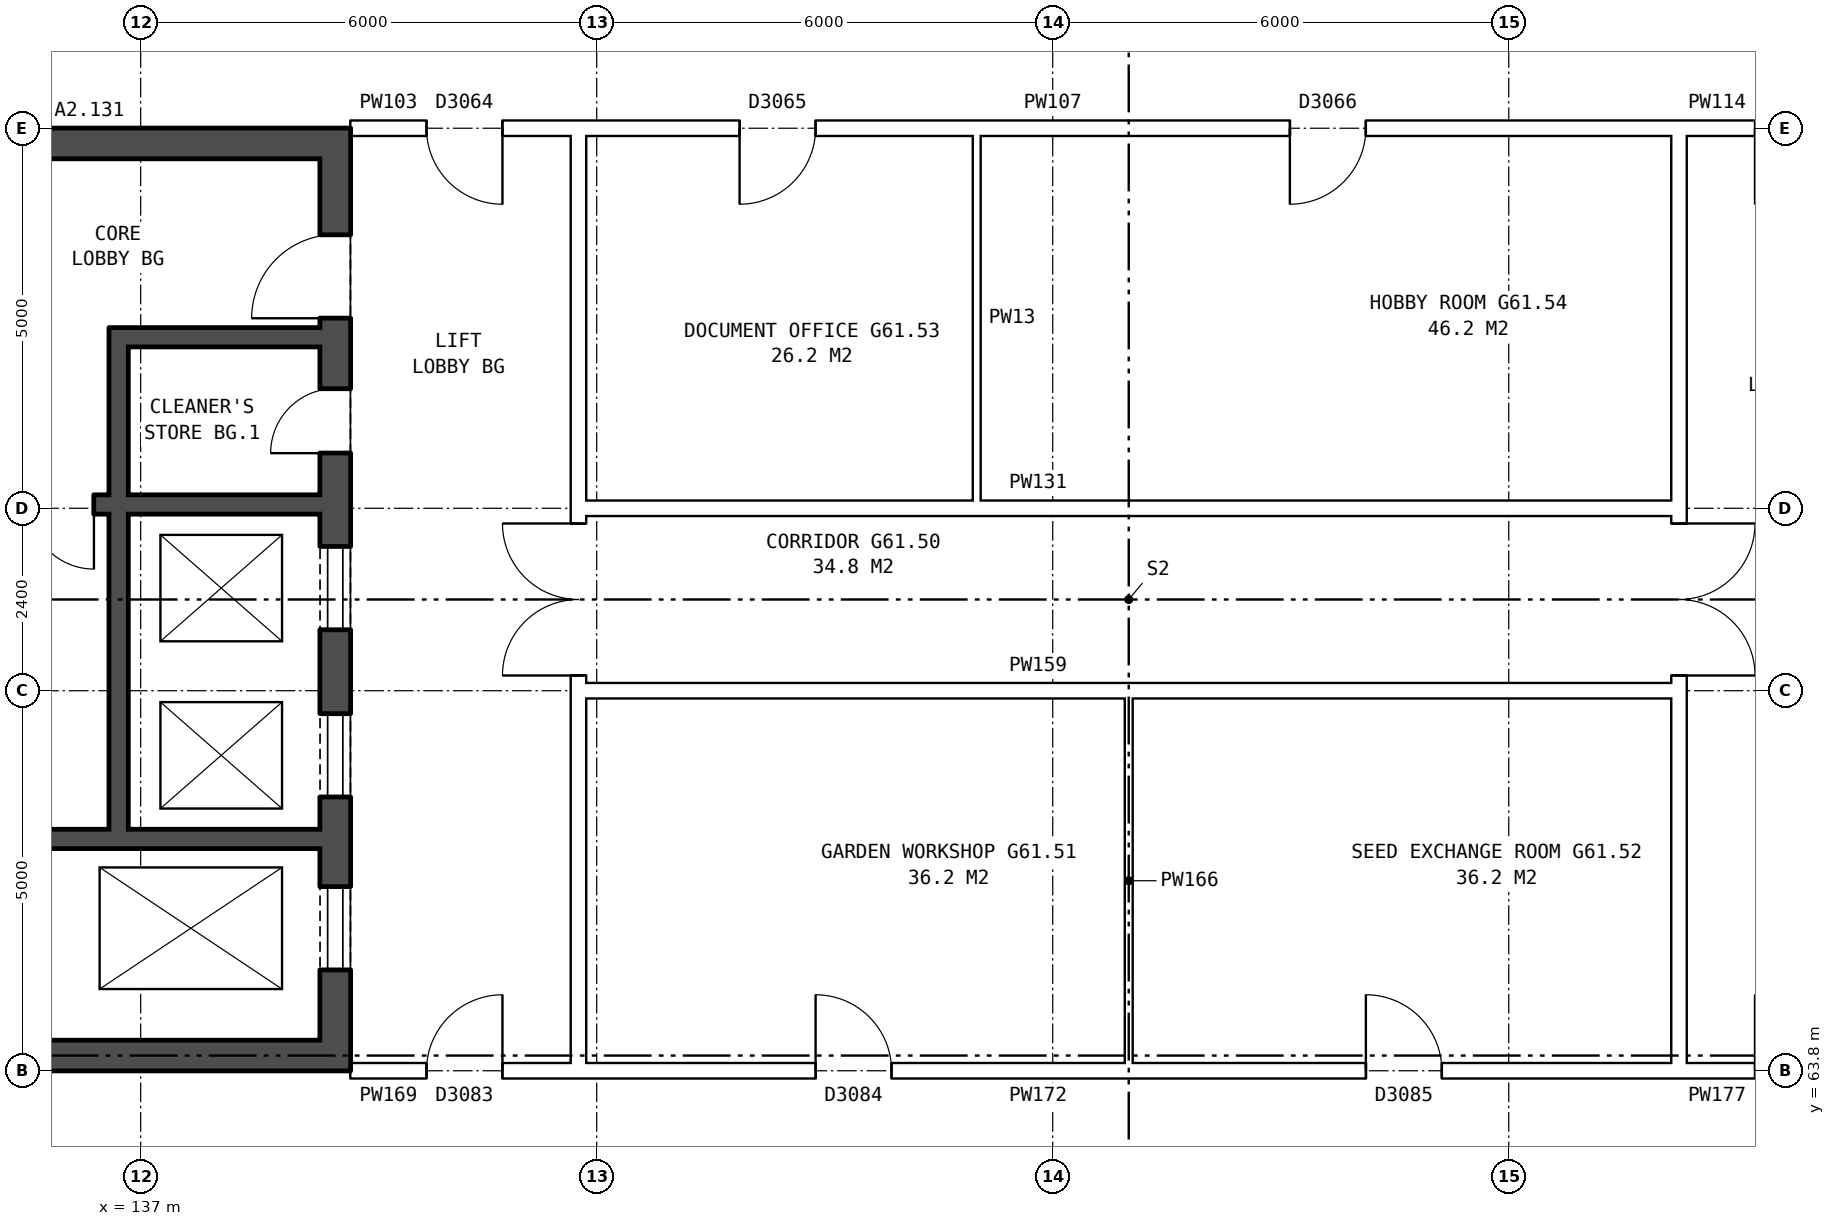
"""IFC4 building model, lengths in metres.
Left out: names, types, materials, properties, quantities, classifications, styles, units other than length and angle.
Written with IfcOpenShell. Run it as: python <this file> out.ifc"""

import sys

from ifc_helpers import new_model, si_unit, direction, frame, frame_2d, origin, place, context, subcontext, project, spatial, rectangle, extrude, element, fill, save


model = new_model("IFC4")
c1 = context("Model", 3, precision=1e-05, world=origin(), true_north=direction((0.0, 1.0)))
c2 = subcontext(c1, "Body", "Model", "MODEL_VIEW")
j1 = project(units=[si_unit("LENGTHUNIT", "METRE"), si_unit("PLANEANGLEUNIT", "RADIAN")], contexts=[c1])
p1 = place(None, origin())
s1 = spatial("IfcSite", under=j1, at=p1, CompositionType="ELEMENT")
p2 = place(p1, origin())
s2 = spatial("IfcBuilding", under=s1, at=p2, CompositionType="ELEMENT")
p3 = place(p2, frame((0.0, 0.0, 215.2)))
s3 = spatial("IfcBuildingStorey", under=s2, at=p3, CompositionType="ELEMENT", Elevation=215.2)
p4 = place(p3, frame((139.56, 63.8, 0.0), z_axis=(0.0, 0.0, 1.0), x_axis=(0.0, 1.0, 0.0)))
e1 = element("IfcWall", 1, at=p4, inside=s3, PredefinedType="SHEAR", context=c2, shape_type="SweptSolid", body=[
    extrude(rectangle(XDim=12.4, YDim=0.4, at=frame_2d((6.2, 0.0))), origin(), (0.0, 0.0, 1.0), 5.6),
])
p5 = place(p4, frame((1.325, 0.0, 0.0)))
e2 = element("IfcOpeningElement", 2, at=p5, cuts=e1, PredefinedType="OPENING", context=c2, shape_type="SweptSolid", body=[
    extrude(rectangle(XDim=1.1, YDim=2.1, at=frame_2d((0.55, 1.05))), frame((0.0, 0.21, 0.0), z_axis=(0.0, -1.0, 0.0), x_axis=(1.0, 0.0, 0.0)), (0.0, 0.0, 1.0), 0.42),
])
p6 = place(p4, frame((3.6, 0.0, 0.0)))
e3 = element("IfcOpeningElement", 3, at=p6, cuts=e1, PredefinedType="OPENING", context=c2, shape_type="SweptSolid", body=[
    extrude(rectangle(XDim=1.1, YDim=2.1, at=frame_2d((0.55, 1.05))), frame((0.0, 0.21, 0.0), z_axis=(0.0, -1.0, 0.0), x_axis=(1.0, 0.0, 0.0)), (0.0, 0.0, 1.0), 0.42),
])
p7 = place(p4, frame((5.8, 0.0, 0.0)))
e4 = element("IfcOpeningElement", 4, at=p7, cuts=e1, PredefinedType="OPENING", context=c2, shape_type="SweptSolid", body=[
    extrude(rectangle(XDim=1.1, YDim=2.1, at=frame_2d((0.55, 1.05))), frame((0.0, 0.21, 0.0), z_axis=(0.0, -1.0, 0.0), x_axis=(1.0, 0.0, 0.0)), (0.0, 0.0, 1.0), 0.42),
])
p8 = place(p4, frame((9.9, 0.0, 0.0)))
e5 = element("IfcOpeningElement", 5, at=p8, cuts=e1, PredefinedType="OPENING", context=c2, shape_type="SweptSolid", body=[
    extrude(rectangle(XDim=1.1, YDim=2.1, at=frame_2d((0.55, 1.05))), frame((0.0, 0.21, 0.0), z_axis=(0.0, -1.0, 0.0), x_axis=(1.0, 0.0, 0.0)), (0.0, 0.0, 1.0), 0.42),
])
p9 = place(p4, frame((8.125, 0.0, 0.0)))
e6 = element("IfcOpeningElement", 6, at=p9, cuts=e1, PredefinedType="OPENING", context=c2, shape_type="SweptSolid", body=[
    extrude(rectangle(XDim=0.85, YDim=2.1, at=frame_2d((0.425, 1.05))), frame((0.0, 0.21, 0.0), z_axis=(0.0, -1.0, 0.0), x_axis=(1.0, 0.0, 0.0)), (0.0, 0.0, 1.0), 0.42),
])
for number, where, z_axis, x_axis in (
    (7, (139.36, 64.0, 0.0), (0.0, 0.0, 1.0), (-1.0, 0.0, 0.0)),
    (8, (139.36, 76.0, 0.0), (0.0, 0.0, 1.0), (-1.0, 0.0, 0.0)),
):
    element("IfcWall", number, at=place(p3, frame(where, z_axis=z_axis, x_axis=x_axis)), inside=s3, PredefinedType="SHEAR", context=c2, shape_type="SweptSolid", body=[
        extrude(rectangle(XDim=7.6, YDim=0.4, at=frame_2d((3.8, 0.0))), origin(), (0.0, 0.0, 1.0), 5.6),
    ])
p10 = place(p3, frame((139.36, 66.85, 0.0), z_axis=(0.0, 0.0, 1.0), x_axis=(-1.0, 0.0, 0.0)))
e9 = element("IfcWall", 9, at=p10, inside=s3, PredefinedType="SHEAR", context=c2, shape_type="SweptSolid", body=[
    extrude(rectangle(XDim=4.775, YDim=0.25, at=frame_2d((2.388, 0.0))), origin(), (0.0, 0.0, 1.0), 5.6),
])
p11 = place(p3, frame((139.36, 71.25, 0.0), z_axis=(0.0, 0.0, 1.0), x_axis=(-1.0, 0.0, 0.0)))
e10 = element("IfcWall", 10, at=p11, inside=s3, PredefinedType="SHEAR", context=c2, shape_type="SweptSolid", body=[
    extrude(rectangle(XDim=7.6, YDim=0.25, at=frame_2d((3.8, 0.0))), origin(), (0.0, 0.0, 1.0), 5.6),
])
p12 = place(p11, frame((5.175, 0.0, 0.0)))
e11 = element("IfcOpeningElement", 11, at=p12, cuts=e10, PredefinedType="OPENING", context=c2, shape_type="SweptSolid", body=[
    extrude(rectangle(XDim=1.1, YDim=2.1, at=frame_2d((0.55, 1.05))), frame((0.0, 0.135, 0.0), z_axis=(0.0, -1.0, 0.0), x_axis=(1.0, 0.0, 0.0)), (0.0, 0.0, 1.0), 0.27),
])
p13 = place(p11, frame((2.975, 0.0, 0.0)))
e12 = element("IfcOpeningElement", 12, at=p13, cuts=e10, PredefinedType="OPENING", context=c2, shape_type="SweptSolid", body=[
    extrude(rectangle(XDim=0.85, YDim=2.1, at=frame_2d((0.425, 1.05))), frame((0.0, 0.135, 0.0), z_axis=(0.0, -1.0, 0.0), x_axis=(1.0, 0.0, 0.0)), (0.0, 0.0, 1.0), 0.27),
])
p14 = place(p3, frame((139.36, 73.45, 0.0), z_axis=(0.0, 0.0, 1.0), x_axis=(-1.0, 0.0, 0.0)))
e13 = element("IfcWall", 13, at=p14, inside=s3, PredefinedType="SHEAR", context=c2, shape_type="SweptSolid", body=[
    extrude(rectangle(XDim=2.525, YDim=0.25, at=frame_2d((1.263, 0.0))), origin(), (0.0, 0.0, 1.0), 5.6),
])
p15 = place(p3, frame((136.71, 66.975, 0.0), z_axis=(0.0, 0.0, 1.0), x_axis=(0.0, 1.0, 0.0)))
e14 = element("IfcWall", 14, at=p15, inside=s3, PredefinedType="SHEAR", context=c2, shape_type="SweptSolid", body=[
    extrude(rectangle(XDim=4.15, YDim=0.25, at=frame_2d((2.075, 0.0))), origin(), (0.0, 0.0, 1.0), 5.6),
])
p16 = place(p3, frame((136.71, 71.375, 0.0), z_axis=(0.0, 0.0, 1.0), x_axis=(0.0, 1.0, 0.0)))
e15 = element("IfcWall", 15, at=p16, inside=s3, PredefinedType="SHEAR", context=c2, shape_type="SweptSolid", body=[
    extrude(rectangle(XDim=2.2, YDim=0.25, at=frame_2d((1.1, 0.0))), origin(), (0.0, 0.0, 1.0), 5.6),
])
p17 = place(p3, frame((142.76, 63.9, 0.0), z_axis=(0.0, 0.0, 1.0), x_axis=(0.0, 1.0, 0.0)))
e16 = element("IfcWall", 16, at=p17, inside=s3, PredefinedType="PARTITIONING", context=c2, shape_type="SweptSolid", body=[
    extrude(rectangle(XDim=12.2, YDim=0.2, at=frame_2d((6.1, 0.0))), origin(), (0.0, 0.0, 1.0), 5.6),
])
p18 = place(p17, frame((5.1, 0.0, 0.0)))
e17 = element("IfcOpeningElement", 17, at=p18, cuts=e16, PredefinedType="OPENING", context=c2, shape_type="SweptSolid", body=[
    extrude(rectangle(XDim=2.0, YDim=2.1, at=frame_2d((1.0, 1.05))), frame((0.0, 0.11, 0.0), z_axis=(0.0, -1.0, 0.0), x_axis=(1.0, 0.0, 0.0)), (0.0, 0.0, 1.0), 0.22),
])
p19 = place(p3, frame((157.24, 63.9, 0.0), z_axis=(0.0, 0.0, 1.0), x_axis=(0.0, 1.0, 0.0)))
e18 = element("IfcWall", 18, at=p19, inside=s3, PredefinedType="PARTITIONING", context=c2, shape_type="SweptSolid", body=[
    extrude(rectangle(XDim=12.2, YDim=0.2, at=frame_2d((6.1, 0.0))), origin(), (0.0, 0.0, 1.0), 5.6),
])
p20 = place(p19, frame((5.1, 0.0, 0.0)))
e19 = element("IfcOpeningElement", 19, at=p20, cuts=e18, PredefinedType="OPENING", context=c2, shape_type="SweptSolid", body=[
    extrude(rectangle(XDim=2.0, YDim=2.1, at=frame_2d((1.0, 1.05))), frame((0.0, 0.11, 0.0), z_axis=(0.0, -1.0, 0.0), x_axis=(1.0, 0.0, 0.0)), (0.0, 0.0, 1.0), 0.22),
])
p21 = place(p3, frame((142.76, 63.8, 0.0), z_axis=(0.0, 0.0, 1.0), x_axis=(1.0, 0.0, 0.0)))
e20 = element("IfcWall", 20, at=p21, inside=s3, PredefinedType="PARTITIONING", context=c2, shape_type="SweptSolid", body=[
    extrude(rectangle(XDim=14.48, YDim=0.2, at=frame_2d((7.24, 0.0))), origin(), (0.0, 0.0, 1.0), 5.6),
])
p22 = place(p21, frame((3.12, 0.0, 0.0)))
e21 = element("IfcOpeningElement", 21, at=p22, cuts=e20, PredefinedType="OPENING", context=c2, shape_type="SweptSolid", body=[
    extrude(rectangle(XDim=1.0, YDim=2.1, at=frame_2d((0.5, 1.05))), frame((0.0, 0.11, 0.0), z_axis=(0.0, -1.0, 0.0), x_axis=(1.0, 0.0, 0.0)), (0.0, 0.0, 1.0), 0.22),
])
p23 = place(p21, frame((10.36, 0.0, 0.0)))
e22 = element("IfcOpeningElement", 22, at=p23, cuts=e20, PredefinedType="OPENING", context=c2, shape_type="SweptSolid", body=[
    extrude(rectangle(XDim=1.0, YDim=2.1, at=frame_2d((0.5, 1.05))), frame((0.0, 0.11, 0.0), z_axis=(0.0, -1.0, 0.0), x_axis=(1.0, 0.0, 0.0)), (0.0, 0.0, 1.0), 0.22),
])
p24 = place(p3, frame((139.76, 63.8, 0.0), z_axis=(0.0, 0.0, 1.0), x_axis=(1.0, 0.0, 0.0)))
e23 = element("IfcWall", 23, at=p24, inside=s3, PredefinedType="PARTITIONING", context=c2, shape_type="SweptSolid", body=[
    extrude(rectangle(XDim=3.0, YDim=0.2, at=frame_2d((1.5, 0.0))), origin(), (0.0, 0.0, 1.0), 5.6),
])
p25 = place(p24, frame((1.0, 0.0, 0.0)))
e24 = element("IfcOpeningElement", 24, at=p25, cuts=e23, PredefinedType="OPENING", context=c2, shape_type="SweptSolid", body=[
    extrude(rectangle(XDim=1.0, YDim=2.1, at=frame_2d((0.5, 1.05))), frame((0.0, 0.11, 0.0), z_axis=(0.0, -1.0, 0.0), x_axis=(1.0, 0.0, 0.0)), (0.0, 0.0, 1.0), 0.22),
])
p26 = place(p3, frame((157.24, 63.8, 0.0), z_axis=(0.0, 0.0, 1.0), x_axis=(1.0, 0.0, 0.0)))
e25 = element("IfcWall", 25, at=p26, inside=s3, PredefinedType="PARTITIONING", context=c2, shape_type="SweptSolid", body=[
    extrude(rectangle(XDim=3.0, YDim=0.2, at=frame_2d((1.5, 0.0))), origin(), (0.0, 0.0, 1.0), 5.6),
])
p27 = place(p26, frame((1.0, 0.0, 0.0)))
e26 = element("IfcOpeningElement", 26, at=p27, cuts=e25, PredefinedType="OPENING", context=c2, shape_type="SweptSolid", body=[
    extrude(rectangle(XDim=1.0, YDim=2.1, at=frame_2d((0.5, 1.05))), frame((0.0, 0.11, 0.0), z_axis=(0.0, -1.0, 0.0), x_axis=(1.0, 0.0, 0.0)), (0.0, 0.0, 1.0), 0.22),
])
for number, where, z_axis, x_axis in (
    (27, (142.76, 68.8, 0.0), (0.0, 0.0, 1.0), (1.0, 0.0, 0.0)),
    (28, (142.76, 71.2, 0.0), (0.0, 0.0, 1.0), (1.0, 0.0, 0.0)),
):
    element("IfcWall", number, at=place(p3, frame(where, z_axis=z_axis, x_axis=x_axis)), inside=s3, PredefinedType="PARTITIONING", context=c2, shape_type="SweptSolid", body=[
        extrude(rectangle(XDim=14.48, YDim=0.2, at=frame_2d((7.24, 0.0))), origin(), (0.0, 0.0, 1.0), 5.6),
    ])
p28 = place(p3, frame((142.76, 76.2, 0.0), z_axis=(0.0, 0.0, 1.0), x_axis=(1.0, 0.0, 0.0)))
e29 = element("IfcWall", 29, at=p28, inside=s3, PredefinedType="PARTITIONING", context=c2, shape_type="SweptSolid", body=[
    extrude(rectangle(XDim=14.48, YDim=0.2, at=frame_2d((7.24, 0.0))), origin(), (0.0, 0.0, 1.0), 5.6),
])
p29 = place(p28, frame((2.12, 0.0, 0.0)))
e30 = element("IfcOpeningElement", 30, at=p29, cuts=e29, PredefinedType="OPENING", context=c2, shape_type="SweptSolid", body=[
    extrude(rectangle(XDim=1.0, YDim=2.1, at=frame_2d((0.5, 1.05))), frame((0.0, 0.11, 0.0), z_axis=(0.0, -1.0, 0.0), x_axis=(1.0, 0.0, 0.0)), (0.0, 0.0, 1.0), 0.22),
])
p30 = place(p28, frame((9.36, 0.0, 0.0)))
e31 = element("IfcOpeningElement", 31, at=p30, cuts=e29, PredefinedType="OPENING", context=c2, shape_type="SweptSolid", body=[
    extrude(rectangle(XDim=1.0, YDim=2.1, at=frame_2d((0.5, 1.05))), frame((0.0, 0.11, 0.0), z_axis=(0.0, -1.0, 0.0), x_axis=(1.0, 0.0, 0.0)), (0.0, 0.0, 1.0), 0.22),
])
p31 = place(p3, frame((139.76, 76.2, 0.0), z_axis=(0.0, 0.0, 1.0), x_axis=(1.0, 0.0, 0.0)))
e32 = element("IfcWall", 32, at=p31, inside=s3, PredefinedType="PARTITIONING", context=c2, shape_type="SweptSolid", body=[
    extrude(rectangle(XDim=3.0, YDim=0.2, at=frame_2d((1.5, 0.0))), origin(), (0.0, 0.0, 1.0), 5.6),
])
p32 = place(p31, frame((1.0, 0.0, 0.0)))
e33 = element("IfcOpeningElement", 33, at=p32, cuts=e32, PredefinedType="OPENING", context=c2, shape_type="SweptSolid", body=[
    extrude(rectangle(XDim=1.0, YDim=2.1, at=frame_2d((0.5, 1.05))), frame((0.0, 0.11, 0.0), z_axis=(0.0, -1.0, 0.0), x_axis=(1.0, 0.0, 0.0)), (0.0, 0.0, 1.0), 0.22),
])
p33 = place(p3, frame((157.24, 76.2, 0.0), z_axis=(0.0, 0.0, 1.0), x_axis=(1.0, 0.0, 0.0)))
e34 = element("IfcWall", 34, at=p33, inside=s3, PredefinedType="PARTITIONING", context=c2, shape_type="SweptSolid", body=[
    extrude(rectangle(XDim=3.0, YDim=0.2, at=frame_2d((1.5, 0.0))), origin(), (0.0, 0.0, 1.0), 5.6),
])
p34 = place(p33, frame((1.0, 0.0, 0.0)))
e35 = element("IfcOpeningElement", 35, at=p34, cuts=e34, PredefinedType="OPENING", context=c2, shape_type="SweptSolid", body=[
    extrude(rectangle(XDim=1.0, YDim=2.1, at=frame_2d((0.5, 1.05))), frame((0.0, 0.11, 0.0), z_axis=(0.0, -1.0, 0.0), x_axis=(1.0, 0.0, 0.0)), (0.0, 0.0, 1.0), 0.22),
])
for number, where, z_axis, x_axis in (
    (36, (148.0, 71.1, 0.0), (0.0, 0.0, 1.0), (0.0, 1.0, 0.0)),
    (37, (150.0, 63.7, 0.0), (0.0, 0.0, 1.0), (0.0, 1.0, 0.0)),
):
    element("IfcWall", number, at=place(p3, frame(where, z_axis=z_axis, x_axis=x_axis)), inside=s3, PredefinedType="PARTITIONING", context=c2, shape_type="SweptSolid", body=[
        extrude(rectangle(XDim=5.2, YDim=0.1, at=frame_2d((2.6, 0.0))), origin(), (0.0, 0.0, 1.0), 5.6),
    ])
p35 = place(p5, origin())
e38 = element("IfcDoor", 38, at=p35, inside=s3, OperationType="DOUBLE_DOOR_SLIDING", PredefinedType="DOOR", context=c2, shape_type="SweptSolid", body=[
    extrude(rectangle(XDim=1.1, YDim=2.1, at=frame_2d((0.55, 1.05))), frame((0.0, 0.185, 0.0), z_axis=(0.0, -1.0, 0.0), x_axis=(1.0, 0.0, 0.0)), (0.0, 0.0, 1.0), 0.05),
])
fill(e2, e38)
p36 = place(p6, origin())
e39 = element("IfcDoor", 39, at=p36, inside=s3, OperationType="DOUBLE_DOOR_SLIDING", PredefinedType="DOOR", context=c2, shape_type="SweptSolid", body=[
    extrude(rectangle(XDim=1.1, YDim=2.1, at=frame_2d((0.55, 1.05))), frame((0.0, 0.185, 0.0), z_axis=(0.0, -1.0, 0.0), x_axis=(1.0, 0.0, 0.0)), (0.0, 0.0, 1.0), 0.05),
])
fill(e3, e39)
p37 = place(p7, origin())
e40 = element("IfcDoor", 40, at=p37, inside=s3, OperationType="DOUBLE_DOOR_SLIDING", PredefinedType="DOOR", context=c2, shape_type="SweptSolid", body=[
    extrude(rectangle(XDim=1.1, YDim=2.1, at=frame_2d((0.55, 1.05))), frame((0.0, 0.185, 0.0), z_axis=(0.0, -1.0, 0.0), x_axis=(1.0, 0.0, 0.0)), (0.0, 0.0, 1.0), 0.05),
])
fill(e4, e40)
p38 = place(p8, origin())
e41 = element("IfcDoor", 41, at=p38, inside=s3, OperationType="SINGLE_SWING_LEFT", PredefinedType="DOOR", context=c2, shape_type="SweptSolid", body=[
    extrude(rectangle(XDim=1.1, YDim=2.1, at=frame_2d((0.55, 1.05))), frame((0.0, 0.185, 0.0), z_axis=(0.0, -1.0, 0.0), x_axis=(1.0, 0.0, 0.0)), (0.0, 0.0, 1.0), 0.05),
])
fill(e5, e41)
p39 = place(p9, origin())
e42 = element("IfcDoor", 42, at=p39, inside=s3, OperationType="SINGLE_SWING_LEFT", PredefinedType="DOOR", context=c2, shape_type="SweptSolid", body=[
    extrude(rectangle(XDim=0.85, YDim=2.1, at=frame_2d((0.425, 1.05))), frame((0.0, 0.185, 0.0), z_axis=(0.0, -1.0, 0.0), x_axis=(1.0, 0.0, 0.0)), (0.0, 0.0, 1.0), 0.05),
])
fill(e6, e42)
p40 = place(p13, origin())
e43 = element("IfcDoor", 43, at=p40, inside=s3, OperationType="SINGLE_SWING_LEFT", PredefinedType="DOOR", context=c2, shape_type="SweptSolid", body=[
    extrude(rectangle(XDim=0.85, YDim=2.1, at=frame_2d((0.425, 1.05))), frame((0.0, 0.025, 0.0), z_axis=(0.0, -1.0, 0.0), x_axis=(1.0, 0.0, 0.0)), (0.0, 0.0, 1.0), 0.05),
])
fill(e12, e43)
p41 = place(p18, origin())
e44 = element("IfcDoor", 44, at=p41, inside=s3, OperationType="DOUBLE_DOOR_SINGLE_SWING", PredefinedType="DOOR", context=c2, shape_type="SweptSolid", body=[
    extrude(rectangle(XDim=2.0, YDim=2.1, at=frame_2d((1.0, 1.05))), frame((0.0, 0.025, 0.0), z_axis=(0.0, -1.0, 0.0), x_axis=(1.0, 0.0, 0.0)), (0.0, 0.0, 1.0), 0.05),
])
fill(e17, e44)
p42 = place(p20, frame((2.0, 0.0, 0.0), z_axis=(0.0, 0.0, 1.0), x_axis=(-1.0, 0.0, 0.0)))
e45 = element("IfcDoor", 45, at=p42, inside=s3, OperationType="DOUBLE_DOOR_SINGLE_SWING", PredefinedType="DOOR", context=c2, shape_type="SweptSolid", body=[
    extrude(rectangle(XDim=2.0, YDim=2.1, at=frame_2d((1.0, 1.05))), frame((0.0, 0.025, 0.0), z_axis=(0.0, -1.0, 0.0), x_axis=(1.0, 0.0, 0.0)), (0.0, 0.0, 1.0), 0.05),
])
fill(e19, e45)
p43 = place(p22, origin())
e46 = element("IfcDoor", 46, at=p43, inside=s3, OperationType="SINGLE_SWING_LEFT", PredefinedType="DOOR", context=c2, shape_type="SweptSolid", body=[
    extrude(rectangle(XDim=1.0, YDim=2.1, at=frame_2d((0.5, 1.05))), frame((0.0, 0.025, 0.0), z_axis=(0.0, -1.0, 0.0), x_axis=(1.0, 0.0, 0.0)), (0.0, 0.0, 1.0), 0.05),
])
fill(e21, e46)
p44 = place(p23, origin())
e47 = element("IfcDoor", 47, at=p44, inside=s3, OperationType="SINGLE_SWING_LEFT", PredefinedType="DOOR", context=c2, shape_type="SweptSolid", body=[
    extrude(rectangle(XDim=1.0, YDim=2.1, at=frame_2d((0.5, 1.05))), frame((0.0, 0.025, 0.0), z_axis=(0.0, -1.0, 0.0), x_axis=(1.0, 0.0, 0.0)), (0.0, 0.0, 1.0), 0.05),
])
fill(e22, e47)
p45 = place(p25, origin())
e48 = element("IfcDoor", 48, at=p45, inside=s3, OperationType="SINGLE_SWING_RIGHT", PredefinedType="DOOR", context=c2, shape_type="SweptSolid", body=[
    extrude(rectangle(XDim=1.0, YDim=2.1, at=frame_2d((0.5, 1.05))), frame((0.0, 0.025, 0.0), z_axis=(0.0, -1.0, 0.0), x_axis=(1.0, 0.0, 0.0)), (0.0, 0.0, 1.0), 0.05),
])
fill(e24, e48)
p46 = place(p29, frame((1.0, 0.0, 0.0), z_axis=(0.0, 0.0, 1.0), x_axis=(-1.0, 0.0, 0.0)))
e49 = element("IfcDoor", 49, at=p46, inside=s3, OperationType="SINGLE_SWING_RIGHT", PredefinedType="DOOR", context=c2, shape_type="SweptSolid", body=[
    extrude(rectangle(XDim=1.0, YDim=2.1, at=frame_2d((0.5, 1.05))), frame((0.0, 0.025, 0.0), z_axis=(0.0, -1.0, 0.0), x_axis=(1.0, 0.0, 0.0)), (0.0, 0.0, 1.0), 0.05),
])
fill(e30, e49)
p47 = place(p30, frame((1.0, 0.0, 0.0), z_axis=(0.0, 0.0, 1.0), x_axis=(-1.0, 0.0, 0.0)))
e50 = element("IfcDoor", 50, at=p47, inside=s3, OperationType="SINGLE_SWING_RIGHT", PredefinedType="DOOR", context=c2, shape_type="SweptSolid", body=[
    extrude(rectangle(XDim=1.0, YDim=2.1, at=frame_2d((0.5, 1.05))), frame((0.0, 0.025, 0.0), z_axis=(0.0, -1.0, 0.0), x_axis=(1.0, 0.0, 0.0)), (0.0, 0.0, 1.0), 0.05),
])
fill(e31, e50)
p48 = place(p32, frame((1.0, 0.0, 0.0), z_axis=(0.0, 0.0, 1.0), x_axis=(-1.0, 0.0, 0.0)))
e51 = element("IfcDoor", 51, at=p48, inside=s3, OperationType="SINGLE_SWING_LEFT", PredefinedType="DOOR", context=c2, shape_type="SweptSolid", body=[
    extrude(rectangle(XDim=1.0, YDim=2.1, at=frame_2d((0.5, 1.05))), frame((0.0, 0.025, 0.0), z_axis=(0.0, -1.0, 0.0), x_axis=(1.0, 0.0, 0.0)), (0.0, 0.0, 1.0), 0.05),
])
fill(e33, e51)
save(model, sys.argv[1])
